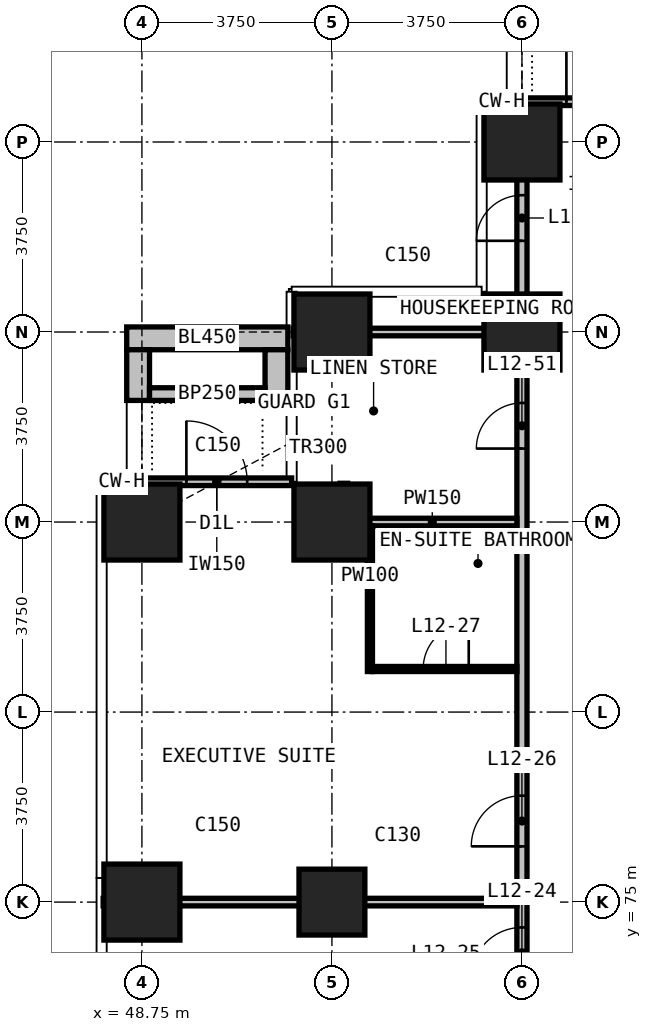
"""IFC4 building model, lengths in metres.
Left out: names, types, materials, properties, quantities, classifications, styles, units other than length and angle.
Written with IfcOpenShell. Run it as: python <this file> out.ifc"""

import sys

from ifc_helpers import new_model, si_unit, direction, frame, frame_2d, origin, origin_2d, place, context, subcontext, project, spatial, rectangle, extrude, element, fill, save


model = new_model("IFC4")
c1 = context("Model", 3, precision=1e-05, world=origin(), true_north=direction((0.0, 1.0)))
c2 = subcontext(c1, "Body", "Model", "MODEL_VIEW")
j1 = project(units=[si_unit("LENGTHUNIT", "METRE"), si_unit("PLANEANGLEUNIT", "RADIAN")], contexts=[c1])
p1 = place(None, origin())
s1 = spatial("IfcSite", under=j1, at=p1, CompositionType="ELEMENT")
p2 = place(p1, origin())
s2 = spatial("IfcBuilding", under=s1, at=p2, CompositionType="ELEMENT")
p3 = place(p2, frame((0.0, 0.0, 59.3)))
s3 = spatial("IfcBuildingStorey", under=s2, at=p3, CompositionType="ELEMENT", Elevation=59.3)
for number, where, z_axis, x_axis in (
    (1, (48.75, 75.0, 0.0), (0.0, 0.0, 1.0), (1.0, 0.0, 0.0)),
    (2, (48.75, 82.5, 0.0), (0.0, 0.0, 1.0), (1.0, 0.0, 0.0)),
):
    element("IfcColumn", number, at=place(p3, frame(where, z_axis=z_axis, x_axis=x_axis)), inside=s3, PredefinedType="COLUMN", context=c2, shape_type="SweptSolid", body=[
        extrude(rectangle(XDim=1.5, YDim=1.5, at=origin_2d()), origin(), (0.0, 0.0, 1.0), 3.3),
    ])
p4 = place(p3, frame((52.5, 75.0, 0.0), z_axis=(0.0, 0.0, 1.0), x_axis=(1.0, 0.0, 0.0)))
e3 = element("IfcColumn", 3, at=p4, inside=s3, PredefinedType="COLUMN", context=c2, shape_type="SweptSolid", body=[
    extrude(rectangle(XDim=1.3, YDim=1.3, at=origin_2d()), origin(), (0.0, 0.0, 1.0), 3.3),
])
for number, where, z_axis, x_axis in (
    (4, (52.5, 82.5, 0.0), (0.0, 0.0, 1.0), (1.0, 0.0, 0.0)),
    (5, (52.5, 86.25, 0.0), (0.0, 0.0, 1.0), (1.0, 0.0, 0.0)),
    (6, (56.25, 86.25, 0.0), (0.0, 0.0, 1.0), (1.0, 0.0, 0.0)),
    (7, (56.25, 90.0, 0.0), (0.0, 0.0, 1.0), (1.0, 0.0, 0.0)),
):
    element("IfcColumn", number, at=place(p3, frame(where, z_axis=z_axis, x_axis=x_axis)), inside=s3, PredefinedType="COLUMN", context=c2, shape_type="SweptSolid", body=[
        extrude(rectangle(XDim=1.5, YDim=1.5, at=origin_2d()), origin(), (0.0, 0.0, 1.0), 3.3),
    ])
p5 = place(p3, frame((56.25, 90.795, 0.0), z_axis=(0.0, 0.0, 1.0), x_axis=(1.0, 0.0, 0.0)))
e8 = element("IfcWall", 8, at=p5, inside=s3, PredefinedType="SOLIDWALL", context=c2, shape_type="SweptSolid", body=[
    extrude(rectangle(XDim=2.955, YDim=0.15, at=frame_2d((1.478, 0.0))), origin(), (0.0, 0.0, 1.0), 3.0),
])
p6 = place(p5, frame((0.877, 0.0, 0.0)))
e9 = element("IfcOpeningElement", 9, at=p6, cuts=e8, PredefinedType="OPENING", context=c2, shape_type="SweptSolid", body=[
    extrude(rectangle(XDim=1.2, YDim=2.4, at=frame_2d((0.6, 1.2))), frame((0.0, 0.085, 0.0), z_axis=(0.0, -1.0, 0.0), x_axis=(1.0, 0.0, 0.0)), (0.0, 0.0, 1.0), 0.17),
])
p7 = place(p3, frame((48.75, 83.295, 0.0), z_axis=(0.0, 0.0, 1.0), x_axis=(1.0, 0.0, 0.0)))
e10 = element("IfcWall", 10, at=p7, inside=s3, PredefinedType="SOLIDWALL", context=c2, shape_type="SweptSolid", body=[
    extrude(rectangle(XDim=2.955, YDim=0.15, at=frame_2d((1.478, 0.0))), origin(), (0.0, 0.0, 1.0), 3.0),
])
p8 = place(p7, frame((0.877, 0.0, 0.0)))
e11 = element("IfcOpeningElement", 11, at=p8, cuts=e10, PredefinedType="OPENING", context=c2, shape_type="SweptSolid", body=[
    extrude(rectangle(XDim=1.2, YDim=2.0, at=frame_2d((0.6, 1.0))), frame((0.0, 0.085, 0.0), z_axis=(0.0, -1.0, 0.0), x_axis=(1.0, 0.0, 0.0)), (0.0, 0.0, 1.0), 0.17),
])
p9 = place(p3, frame((48.45, 86.125, 0.0), z_axis=(0.0, 0.0, 1.0), x_axis=(1.0, 0.0, 0.0)))
e12 = element("IfcWall", 12, at=p9, inside=s3, PredefinedType="USERDEFINED", context=c2, shape_type="SweptSolid", body=[
    extrude(rectangle(XDim=3.18, YDim=0.45, at=frame_2d((1.59, 0.0))), origin(), (0.0, 0.0, 1.0), 1.1),
])
for number, where, z_axis, x_axis in (
    (13, (48.675, 84.9, 0.0), (0.0, 0.0, 1.0), (0.0, 1.0, 0.0)),
    (14, (51.405, 84.9, 0.0), (0.0, 0.0, 1.0), (0.0, 1.0, 0.0)),
):
    element("IfcWall", number, at=place(p3, frame(where, z_axis=z_axis, x_axis=x_axis)), inside=s3, PredefinedType="USERDEFINED", context=c2, shape_type="SweptSolid", body=[
        extrude(rectangle(XDim=1.0, YDim=0.45, at=frame_2d((0.5, 0.0))), origin(), (0.0, 0.0, 1.0), 1.1),
    ])
p10 = place(p3, frame((48.9, 85.025, 0.0), z_axis=(0.0, 0.0, 1.0), x_axis=(1.0, 0.0, 0.0)))
e15 = element("IfcWall", 15, at=p10, inside=s3, PredefinedType="USERDEFINED", context=c2, shape_type="SweptSolid", body=[
    extrude(rectangle(XDim=2.28, YDim=0.25, at=frame_2d((1.14, 0.0))), origin(), (0.0, 0.0, 1.0), 1.0),
])
p11 = place(p3, frame((56.25, 52.4, 0.0), z_axis=(0.0, 0.0, 1.0), x_axis=(0.0, 1.0, 0.0)))
e16 = element("IfcWall", 16, at=p11, inside=s3, PredefinedType="PARTITIONING", context=c2, shape_type="SweptSolid", body=[
    extrude(rectangle(XDim=38.31, YDim=0.2, at=frame_2d((19.155, 0.0))), origin(), (0.0, 0.0, 1.0), 3.0),
])
p12 = place(p11, frame((2.35, 0.0, 0.0)))
e17 = element("IfcOpeningElement", 17, at=p12, cuts=e16, PredefinedType="OPENING", context=c2, shape_type="SweptSolid", body=[
    extrude(rectangle(XDim=1.0, YDim=2.2, at=frame_2d((0.5, 1.1))), frame((0.0, 0.11, 0.0), z_axis=(0.0, -1.0, 0.0), x_axis=(1.0, 0.0, 0.0)), (0.0, 0.0, 1.0), 0.22),
])
p13 = place(p11, frame((4.35, 0.0, 0.0)))
e18 = element("IfcOpeningElement", 18, at=p13, cuts=e16, PredefinedType="OPENING", context=c2, shape_type="SweptSolid", body=[
    extrude(rectangle(XDim=1.0, YDim=2.2, at=frame_2d((0.5, 1.1))), frame((0.0, 0.11, 0.0), z_axis=(0.0, -1.0, 0.0), x_axis=(1.0, 0.0, 0.0)), (0.0, 0.0, 1.0), 0.22),
])
p14 = place(p11, frame((13.0, 0.0, 0.0)))
e19 = element("IfcOpeningElement", 19, at=p14, cuts=e16, PredefinedType="OPENING", context=c2, shape_type="SweptSolid", body=[
    extrude(rectangle(XDim=1.0, YDim=2.2, at=frame_2d((0.5, 1.1))), frame((0.0, 0.11, 0.0), z_axis=(0.0, -1.0, 0.0), x_axis=(1.0, 0.0, 0.0)), (0.0, 0.0, 1.0), 0.22),
])
p15 = place(p11, frame((15.6, 0.0, 0.0)))
e20 = element("IfcOpeningElement", 20, at=p15, cuts=e16, PredefinedType="OPENING", context=c2, shape_type="SweptSolid", body=[
    extrude(rectangle(XDim=1.0, YDim=2.2, at=frame_2d((0.5, 1.1))), frame((0.0, 0.11, 0.0), z_axis=(0.0, -1.0, 0.0), x_axis=(1.0, 0.0, 0.0)), (0.0, 0.0, 1.0), 0.22),
])
p16 = place(p11, frame((21.1, 0.0, 0.0)))
e21 = element("IfcOpeningElement", 21, at=p16, cuts=e16, PredefinedType="OPENING", context=c2, shape_type="SweptSolid", body=[
    extrude(rectangle(XDim=1.0, YDim=2.2, at=frame_2d((0.5, 1.1))), frame((0.0, 0.11, 0.0), z_axis=(0.0, -1.0, 0.0), x_axis=(1.0, 0.0, 0.0)), (0.0, 0.0, 1.0), 0.22),
])
p17 = place(p11, frame((23.7, 0.0, 0.0)))
e22 = element("IfcOpeningElement", 22, at=p17, cuts=e16, PredefinedType="OPENING", context=c2, shape_type="SweptSolid", body=[
    extrude(rectangle(XDim=1.0, YDim=2.2, at=frame_2d((0.5, 1.1))), frame((0.0, 0.11, 0.0), z_axis=(0.0, -1.0, 0.0), x_axis=(1.0, 0.0, 0.0)), (0.0, 0.0, 1.0), 0.22),
])
p18 = place(p11, frame((31.55, 0.0, 0.0)))
e23 = element("IfcOpeningElement", 23, at=p18, cuts=e16, PredefinedType="OPENING", context=c2, shape_type="SweptSolid", body=[
    extrude(rectangle(XDim=0.9, YDim=2.2, at=frame_2d((0.45, 1.1))), frame((0.0, 0.11, 0.0), z_axis=(0.0, -1.0, 0.0), x_axis=(1.0, 0.0, 0.0)), (0.0, 0.0, 1.0), 0.22),
])
p19 = place(p11, frame((35.65, 0.0, 0.0)))
e24 = element("IfcOpeningElement", 24, at=p19, cuts=e16, PredefinedType="OPENING", context=c2, shape_type="SweptSolid", body=[
    extrude(rectangle(XDim=0.9, YDim=2.2, at=frame_2d((0.45, 1.1))), frame((0.0, 0.11, 0.0), z_axis=(0.0, -1.0, 0.0), x_axis=(1.0, 0.0, 0.0)), (0.0, 0.0, 1.0), 0.22),
])
p20 = place(p3, frame((47.985, 75.0, 0.0), z_axis=(0.0, 0.0, 1.0), x_axis=(1.0, 0.0, 0.0)))
e25 = element("IfcWall", 25, at=p20, inside=s3, PredefinedType="PARTITIONING", context=c2, shape_type="SweptSolid", body=[
    extrude(rectangle(XDim=8.165, YDim=0.15, at=frame_2d((4.083, 0.0))), origin(), (0.0, 0.0, 1.0), 3.0),
])
p21 = place(p3, frame((52.81, 82.5, 0.0), z_axis=(0.0, 0.0, 1.0), x_axis=(1.0, 0.0, 0.0)))
e26 = element("IfcWall", 26, at=p21, inside=s3, PredefinedType="PARTITIONING", context=c2, shape_type="SweptSolid", body=[
    extrude(rectangle(XDim=3.34, YDim=0.15, at=frame_2d((1.67, 0.0))), origin(), (0.0, 0.0, 1.0), 3.0),
])
p22 = place(p3, frame((51.735, 86.25, 0.0), z_axis=(0.0, 0.0, 1.0), x_axis=(1.0, 0.0, 0.0)))
e27 = element("IfcWall", 27, at=p22, inside=s3, PredefinedType="PARTITIONING", context=c2, shape_type="SweptSolid", body=[
    extrude(rectangle(XDim=4.415, YDim=0.15, at=frame_2d((2.208, 0.0))), origin(), (0.0, 0.0, 1.0), 3.0),
])
p23 = place(p3, frame((52.735, 82.425, 0.0), z_axis=(0.0, 0.0, 1.0), x_axis=(0.0, 1.0, 0.0)))
e28 = element("IfcWall", 28, at=p23, inside=s3, PredefinedType="PARTITIONING", context=c2, shape_type="SweptSolid", body=[
    extrude(rectangle(XDim=0.84, YDim=0.15, at=frame_2d((0.42, 0.0))), origin(), (0.0, 0.0, 1.0), 3.0),
])
p24 = place(p3, frame((53.3, 79.6, 0.0), z_axis=(0.0, 0.0, 1.0), x_axis=(1.0, 0.0, 0.0)))
e29 = element("IfcWall", 29, at=p24, inside=s3, PredefinedType="PARTITIONING", context=c2, shape_type="SweptSolid", body=[
    extrude(rectangle(XDim=2.85, YDim=0.1, at=frame_2d((1.425, 0.0))), origin(), (0.0, 0.0, 1.0), 3.0),
])
p25 = place(p24, frame((1.0, 0.0, 0.0)))
e30 = element("IfcOpeningElement", 30, at=p25, cuts=e29, PredefinedType="OPENING", context=c2, shape_type="SweptSolid", body=[
    extrude(rectangle(XDim=0.9, YDim=2.2, at=frame_2d((0.45, 1.1))), frame((0.0, 0.06, 0.0), z_axis=(0.0, -1.0, 0.0), x_axis=(1.0, 0.0, 0.0)), (0.0, 0.0, 1.0), 0.12),
])
p26 = place(p3, frame((53.25, 79.55, 0.0), z_axis=(0.0, 0.0, 1.0), x_axis=(0.0, 1.0, 0.0)))
e31 = element("IfcWall", 31, at=p26, inside=s3, PredefinedType="PARTITIONING", context=c2, shape_type="SweptSolid", body=[
    extrude(rectangle(XDim=2.875, YDim=0.1, at=frame_2d((1.438, 0.0))), origin(), (0.0, 0.0, 1.0), 3.0),
])
p27 = place(p6, origin())
e32 = element("IfcDoor", 32, at=p27, inside=s3, OperationType="SINGLE_SWING_LEFT", PredefinedType="DOOR", context=c2, shape_type="SweptSolid", body=[
    extrude(rectangle(XDim=1.2, YDim=2.4, at=frame_2d((0.6, 1.2))), frame((0.0, 0.025, 0.0), z_axis=(0.0, -1.0, 0.0), x_axis=(1.0, 0.0, 0.0)), (0.0, 0.0, 1.0), 0.05),
])
fill(e9, e32)
p28 = place(p8, origin())
e33 = element("IfcDoor", 33, at=p28, inside=s3, OperationType="SINGLE_SWING_LEFT", PredefinedType="DOOR", context=c2, shape_type="SweptSolid", body=[
    extrude(rectangle(XDim=1.2, YDim=2.0, at=frame_2d((0.6, 1.0))), frame((0.0, 0.025, 0.0), z_axis=(0.0, -1.0, 0.0), x_axis=(1.0, 0.0, 0.0)), (0.0, 0.0, 1.0), 0.05),
])
fill(e11, e33)
p29 = place(p16, origin())
e34 = element("IfcDoor", 34, at=p29, inside=s3, OperationType="SINGLE_SWING_LEFT", PredefinedType="DOOR", context=c2, shape_type="SweptSolid", body=[
    extrude(rectangle(XDim=1.0, YDim=2.2, at=frame_2d((0.5, 1.1))), frame((0.0, 0.025, 0.0), z_axis=(0.0, -1.0, 0.0), x_axis=(1.0, 0.0, 0.0)), (0.0, 0.0, 1.0), 0.05),
])
fill(e21, e34)
p30 = place(p17, origin())
e35 = element("IfcDoor", 35, at=p30, inside=s3, OperationType="SINGLE_SWING_LEFT", PredefinedType="DOOR", context=c2, shape_type="SweptSolid", body=[
    extrude(rectangle(XDim=1.0, YDim=2.2, at=frame_2d((0.5, 1.1))), frame((0.0, 0.025, 0.0), z_axis=(0.0, -1.0, 0.0), x_axis=(1.0, 0.0, 0.0)), (0.0, 0.0, 1.0), 0.05),
])
fill(e22, e35)
p31 = place(p25, origin())
e36 = element("IfcDoor", 36, at=p31, inside=s3, OperationType="SINGLE_SWING_RIGHT", PredefinedType="DOOR", context=c2, shape_type="SweptSolid", body=[
    extrude(rectangle(XDim=0.9, YDim=2.2, at=frame_2d((0.45, 1.1))), frame((0.0, 0.025, 0.0), z_axis=(0.0, -1.0, 0.0), x_axis=(1.0, 0.0, 0.0)), (0.0, 0.0, 1.0), 0.05),
])
fill(e30, e36)
p32 = place(p18, origin())
e37 = element("IfcDoor", 37, at=p32, inside=s3, OperationType="SINGLE_SWING_LEFT", PredefinedType="DOOR", context=c2, shape_type="SweptSolid", body=[
    extrude(rectangle(XDim=0.9, YDim=2.2, at=frame_2d((0.45, 1.1))), frame((0.0, 0.025, 0.0), z_axis=(0.0, -1.0, 0.0), x_axis=(1.0, 0.0, 0.0)), (0.0, 0.0, 1.0), 0.05),
])
fill(e23, e37)
p33 = place(p19, origin())
e38 = element("IfcDoor", 38, at=p33, inside=s3, OperationType="SINGLE_SWING_LEFT", PredefinedType="DOOR", context=c2, shape_type="SweptSolid", body=[
    extrude(rectangle(XDim=0.9, YDim=2.2, at=frame_2d((0.45, 1.1))), frame((0.0, 0.025, 0.0), z_axis=(0.0, -1.0, 0.0), x_axis=(1.0, 0.0, 0.0)), (0.0, 0.0, 1.0), 0.05),
])
fill(e24, e38)
save(model, sys.argv[1])
